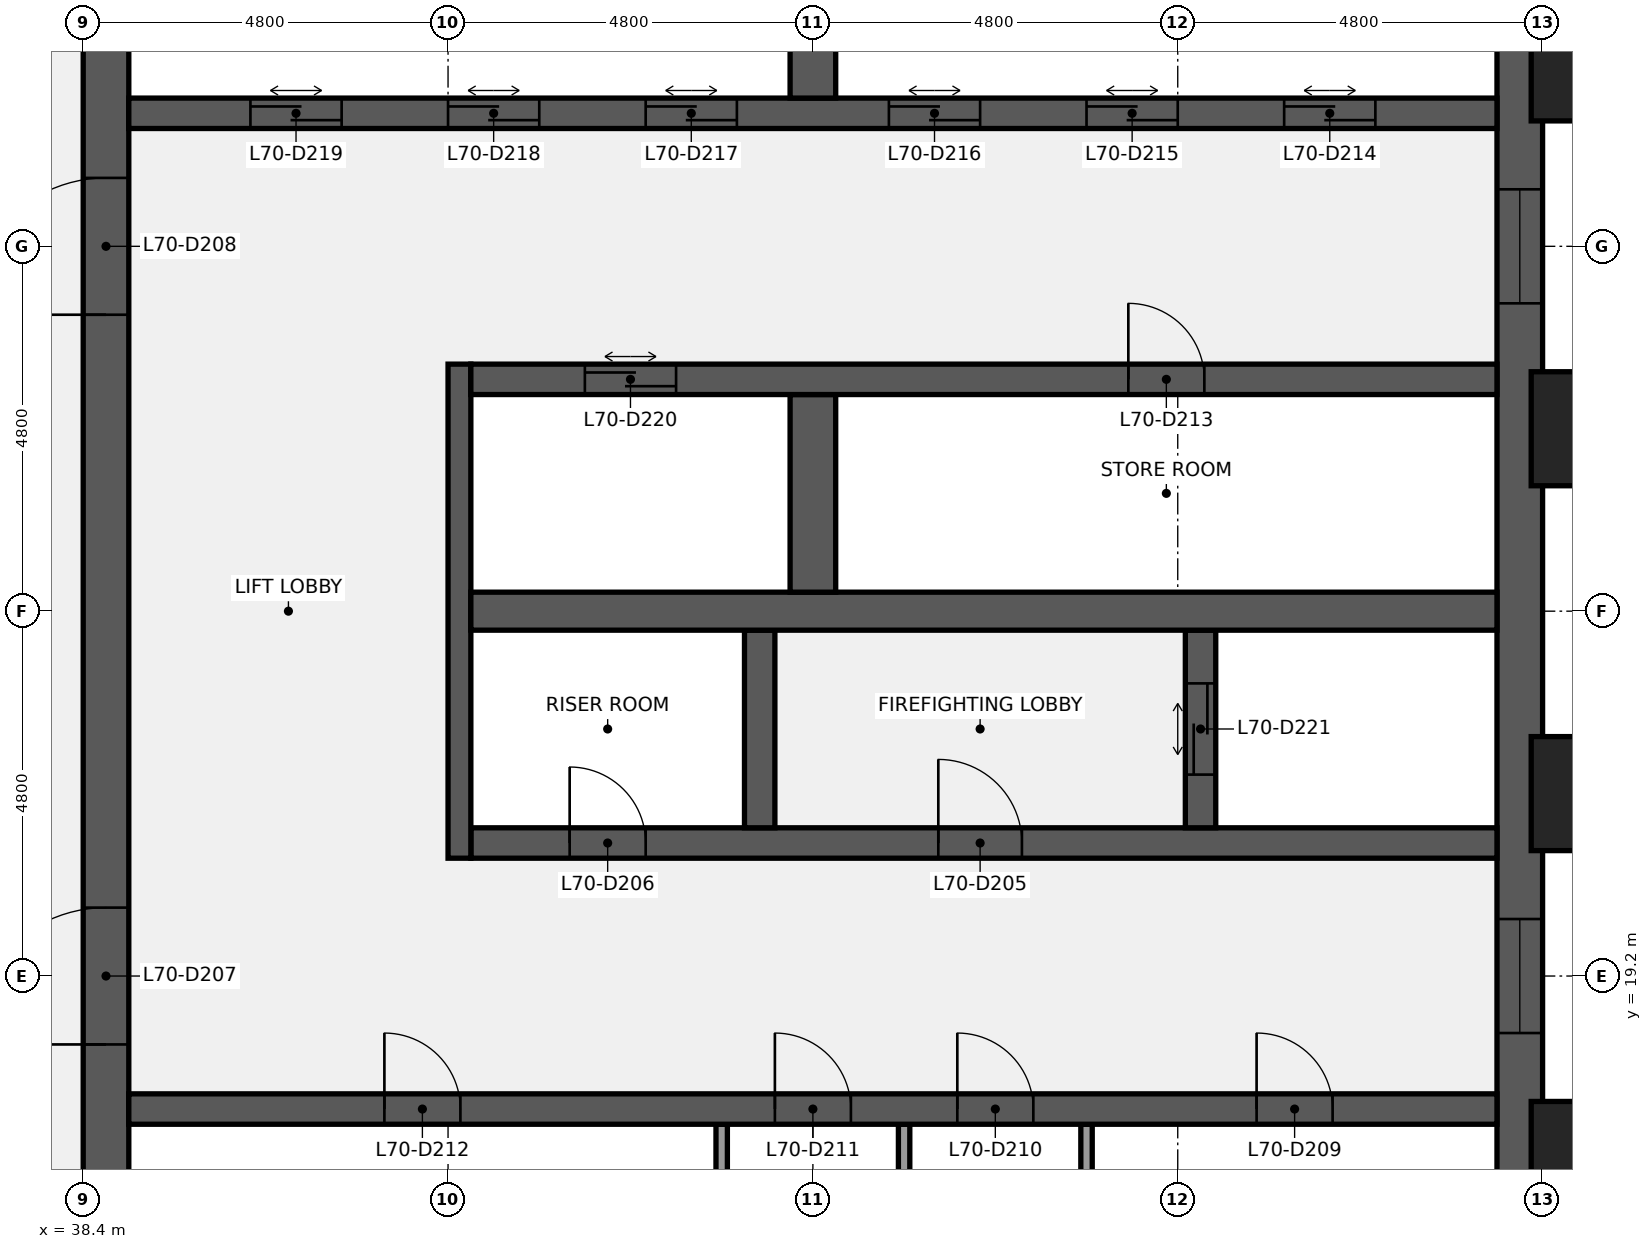
"""IFC4 building model, lengths in metres.
Left out: names, types, materials, properties, quantities, classifications, styles, units other than length and angle.
Written with IfcOpenShell. Run it as: python <this file> out.ifc"""

import sys

from ifc_helpers import new_model, si_unit, direction, frame, frame_2d, origin, origin_2d, place, context, subcontext, project, spatial, rectangle, extrude, element, fill, save


model = new_model("IFC4")
c1 = context("Model", 3, precision=1e-05, world=origin(), true_north=direction((0.0, 1.0)))
c2 = subcontext(c1, "Body", "Model", "MODEL_VIEW")
j1 = project(units=[si_unit("LENGTHUNIT", "METRE"), si_unit("PLANEANGLEUNIT", "RADIAN")], contexts=[c1])
p1 = place(None, origin())
s1 = spatial("IfcSite", under=j1, at=p1, CompositionType="ELEMENT")
p2 = place(p1, origin())
s2 = spatial("IfcBuilding", under=s1, at=p2, CompositionType="ELEMENT")
p3 = place(p2, frame((0.0, 0.0, 318.3)))
s3 = spatial("IfcBuildingStorey", under=s2, at=p3, CompositionType="ELEMENT", Elevation=318.3)
p4 = place(p3, frame((57.3, 38.4, 0.0), z_axis=(0.0, 0.0, 1.0), x_axis=(0.0, -1.0, 0.0)))
e1 = element("IfcWall", 1, at=p4, inside=s3, PredefinedType="SHEAR", context=c2, shape_type="SweptSolid", body=[
    extrude(rectangle(XDim=28.8, YDim=0.6, at=frame_2d((14.4, 0.0))), origin(), (0.0, 0.0, 1.0), 3.84),
])
p5 = place(p4, frame((18.45, 0.0, 0.9)))
e2 = element("IfcOpeningElement", 2, at=p5, cuts=e1, PredefinedType="OPENING", context=c2, shape_type="SweptSolid", body=[
    extrude(rectangle(XDim=1.5, YDim=1.5, at=frame_2d((0.75, 0.75))), frame((0.0, 0.31, 0.0), z_axis=(0.0, -1.0, 0.0), x_axis=(1.0, 0.0, 0.0)), (0.0, 0.0, 1.0), 0.62),
])
p6 = place(p4, frame((8.85, 0.0, 0.9)))
e3 = element("IfcOpeningElement", 3, at=p6, cuts=e1, PredefinedType="OPENING", context=c2, shape_type="SweptSolid", body=[
    extrude(rectangle(XDim=1.5, YDim=1.5, at=frame_2d((0.75, 0.75))), frame((0.0, 0.31, 0.0), z_axis=(0.0, -1.0, 0.0), x_axis=(1.0, 0.0, 0.0)), (0.0, 0.0, 1.0), 0.62),
])
p7 = place(p3, frame((38.7, 9.6, 0.0), z_axis=(0.0, 0.0, 1.0), x_axis=(0.0, 1.0, 0.0)))
e4 = element("IfcWall", 4, at=p7, inside=s3, PredefinedType="SHEAR", context=c2, shape_type="SweptSolid", body=[
    extrude(rectangle(XDim=28.8, YDim=0.6, at=frame_2d((14.4, 0.0))), origin(), (0.0, 0.0, 1.0), 3.84),
])
p8 = place(p7, frame((8.7, 0.0, 0.0)))
e5 = element("IfcOpeningElement", 5, at=p8, cuts=e4, PredefinedType="OPENING", context=c2, shape_type="SweptSolid", body=[
    extrude(rectangle(XDim=1.8, YDim=2.1, at=frame_2d((0.9, 1.05))), frame((0.0, 0.31, 0.0), z_axis=(0.0, -1.0, 0.0), x_axis=(1.0, 0.0, 0.0)), (0.0, 0.0, 1.0), 0.62),
])
p9 = place(p7, frame((18.3, 0.0, 0.0)))
e6 = element("IfcOpeningElement", 6, at=p9, cuts=e4, PredefinedType="OPENING", context=c2, shape_type="SweptSolid", body=[
    extrude(rectangle(XDim=1.8, YDim=2.1, at=frame_2d((0.9, 1.05))), frame((0.0, 0.31, 0.0), z_axis=(0.0, -1.0, 0.0), x_axis=(1.0, 0.0, 0.0)), (0.0, 0.0, 1.0), 0.62),
])
for number, where, z_axis, x_axis in (
    (7, (51.6, 14.65, 0.0), (0.0, 0.0, 1.0), (0.0, 1.0, 0.0)),
    (8, (49.2, 14.65, 0.0), (0.0, 0.0, 1.0), (0.0, 1.0, 0.0)),
    (9, (46.8, 14.65, 0.0), (0.0, 0.0, 1.0), (0.0, 1.0, 0.0)),
):
    element("IfcWall", number, at=place(p3, frame(where, z_axis=z_axis, x_axis=x_axis)), inside=s3, PredefinedType="PARTITIONING", context=c2, shape_type="SweptSolid", body=[
        extrude(rectangle(XDim=2.6, YDim=0.15, at=frame_2d((1.3, 0.0))), origin(), (0.0, 0.0, 1.0), 3.84),
    ])
p10 = place(p3, frame((39.0, 17.45, 0.0), z_axis=(0.0, 0.0, 1.0), x_axis=(1.0, 0.0, 0.0)))
e10 = element("IfcWall", 10, at=p10, inside=s3, PredefinedType="SHEAR", context=c2, shape_type="SweptSolid", body=[
    extrude(rectangle(XDim=18.0, YDim=0.4, at=frame_2d((9.0, 0.0))), origin(), (0.0, 0.0, 1.0), 3.84),
])
p11 = place(p10, frame((14.837, 0.0, 0.0)))
e11 = element("IfcOpeningElement", 11, at=p11, cuts=e10, PredefinedType="OPENING", context=c2, shape_type="SweptSolid", body=[
    extrude(rectangle(XDim=1.0, YDim=2.1, at=frame_2d((0.5, 1.05))), frame((0.0, 0.21, 0.0), z_axis=(0.0, -1.0, 0.0), x_axis=(1.0, 0.0, 0.0)), (0.0, 0.0, 1.0), 0.42),
])
p12 = place(p10, frame((10.9, 0.0, 0.0)))
e12 = element("IfcOpeningElement", 12, at=p12, cuts=e10, PredefinedType="OPENING", context=c2, shape_type="SweptSolid", body=[
    extrude(rectangle(XDim=1.0, YDim=2.1, at=frame_2d((0.5, 1.05))), frame((0.0, 0.21, 0.0), z_axis=(0.0, -1.0, 0.0), x_axis=(1.0, 0.0, 0.0)), (0.0, 0.0, 1.0), 0.42),
])
p13 = place(p10, frame((8.5, 0.0, 0.0)))
e13 = element("IfcOpeningElement", 13, at=p13, cuts=e10, PredefinedType="OPENING", context=c2, shape_type="SweptSolid", body=[
    extrude(rectangle(XDim=1.0, YDim=2.1, at=frame_2d((0.5, 1.05))), frame((0.0, 0.21, 0.0), z_axis=(0.0, -1.0, 0.0), x_axis=(1.0, 0.0, 0.0)), (0.0, 0.0, 1.0), 0.42),
])
p14 = place(p10, frame((3.363, 0.0, 0.0)))
e14 = element("IfcOpeningElement", 14, at=p14, cuts=e10, PredefinedType="OPENING", context=c2, shape_type="SweptSolid", body=[
    extrude(rectangle(XDim=1.0, YDim=2.1, at=frame_2d((0.5, 1.05))), frame((0.0, 0.21, 0.0), z_axis=(0.0, -1.0, 0.0), x_axis=(1.0, 0.0, 0.0)), (0.0, 0.0, 1.0), 0.42),
])
p15 = place(p3, frame((43.5, 20.95, 0.0), z_axis=(0.0, 0.0, 1.0), x_axis=(1.0, 0.0, 0.0)))
e15 = element("IfcWall", 15, at=p15, inside=s3, PredefinedType="SHEAR", context=c2, shape_type="SweptSolid", body=[
    extrude(rectangle(XDim=13.5, YDim=0.4, at=frame_2d((6.75, 0.0))), origin(), (0.0, 0.0, 1.0), 3.84),
])
p16 = place(p15, frame((6.15, 0.0, 0.0)))
e16 = element("IfcOpeningElement", 16, at=p16, cuts=e15, PredefinedType="OPENING", context=c2, shape_type="SweptSolid", body=[
    extrude(rectangle(XDim=1.1, YDim=2.1, at=frame_2d((0.55, 1.05))), frame((0.0, 0.21, 0.0), z_axis=(0.0, -1.0, 0.0), x_axis=(1.0, 0.0, 0.0)), (0.0, 0.0, 1.0), 0.42),
])
p17 = place(p15, frame((1.3, 0.0, 0.0)))
e17 = element("IfcOpeningElement", 17, at=p17, cuts=e15, PredefinedType="OPENING", context=c2, shape_type="SweptSolid", body=[
    extrude(rectangle(XDim=1.0, YDim=2.1, at=frame_2d((0.5, 1.05))), frame((0.0, 0.21, 0.0), z_axis=(0.0, -1.0, 0.0), x_axis=(1.0, 0.0, 0.0)), (0.0, 0.0, 1.0), 0.42),
])
p18 = place(p3, frame((43.35, 20.75, 0.0), z_axis=(0.0, 0.0, 1.0), x_axis=(0.0, 1.0, 0.0)))
e18 = element("IfcWall", 18, at=p18, inside=s3, PredefinedType="SHEAR", context=c2, shape_type="SweptSolid", body=[
    extrude(rectangle(XDim=6.5, YDim=0.3, at=frame_2d((3.25, 0.0))), origin(), (0.0, 0.0, 1.0), 3.84),
])
p19 = place(p3, frame((53.1, 21.15, 0.0), z_axis=(0.0, 0.0, 1.0), x_axis=(0.0, 1.0, 0.0)))
e19 = element("IfcWall", 19, at=p19, inside=s3, PredefinedType="SHEAR", context=c2, shape_type="SweptSolid", body=[
    extrude(rectangle(XDim=2.6, YDim=0.4, at=frame_2d((1.3, 0.0))), origin(), (0.0, 0.0, 1.0), 3.84),
])
p20 = place(p19, frame((0.7, 0.0, 0.0)))
e20 = element("IfcOpeningElement", 20, at=p20, cuts=e19, PredefinedType="OPENING", context=c2, shape_type="SweptSolid", body=[
    extrude(rectangle(XDim=1.2, YDim=2.1, at=frame_2d((0.6, 1.05))), frame((0.0, 0.21, 0.0), z_axis=(0.0, -1.0, 0.0), x_axis=(1.0, 0.0, 0.0)), (0.0, 0.0, 1.0), 0.42),
])
p21 = place(p3, frame((47.3, 21.15, 0.0), z_axis=(0.0, 0.0, 1.0), x_axis=(0.0, 1.0, 0.0)))
e21 = element("IfcWall", 21, at=p21, inside=s3, PredefinedType="SHEAR", context=c2, shape_type="SweptSolid", body=[
    extrude(rectangle(XDim=2.6, YDim=0.4, at=frame_2d((1.3, 0.0))), origin(), (0.0, 0.0, 1.0), 3.84),
])
p22 = place(p3, frame((43.5, 24.0, 0.0), z_axis=(0.0, 0.0, 1.0), x_axis=(1.0, 0.0, 0.0)))
e22 = element("IfcWall", 22, at=p22, inside=s3, PredefinedType="SHEAR", context=c2, shape_type="SweptSolid", body=[
    extrude(rectangle(XDim=13.5, YDim=0.5, at=frame_2d((6.75, 0.0))), origin(), (0.0, 0.0, 1.0), 3.84),
])
p23 = place(p3, frame((48.0, 24.25, 0.0), z_axis=(0.0, 0.0, 1.0), x_axis=(0.0, 1.0, 0.0)))
e23 = element("IfcWall", 23, at=p23, inside=s3, PredefinedType="SHEAR", context=c2, shape_type="SweptSolid", body=[
    extrude(rectangle(XDim=2.6, YDim=0.6, at=frame_2d((1.3, 0.0))), origin(), (0.0, 0.0, 1.0), 3.84),
])
p24 = place(p3, frame((43.5, 27.05, 0.0), z_axis=(0.0, 0.0, 1.0), x_axis=(1.0, 0.0, 0.0)))
e24 = element("IfcWall", 24, at=p24, inside=s3, PredefinedType="SHEAR", context=c2, shape_type="SweptSolid", body=[
    extrude(rectangle(XDim=13.5, YDim=0.4, at=frame_2d((6.75, 0.0))), origin(), (0.0, 0.0, 1.0), 3.84),
])
p25 = place(p24, frame((8.65, 0.0, 0.0)))
e25 = element("IfcOpeningElement", 25, at=p25, cuts=e24, PredefinedType="OPENING", context=c2, shape_type="SweptSolid", body=[
    extrude(rectangle(XDim=1.0, YDim=2.1, at=frame_2d((0.5, 1.05))), frame((0.0, 0.21, 0.0), z_axis=(0.0, -1.0, 0.0), x_axis=(1.0, 0.0, 0.0)), (0.0, 0.0, 1.0), 0.42),
])
p26 = place(p24, frame((1.5, 0.0, 0.0)))
e26 = element("IfcOpeningElement", 26, at=p26, cuts=e24, PredefinedType="OPENING", context=c2, shape_type="SweptSolid", body=[
    extrude(rectangle(XDim=1.2, YDim=2.1, at=frame_2d((0.6, 1.05))), frame((0.0, 0.21, 0.0), z_axis=(0.0, -1.0, 0.0), x_axis=(1.0, 0.0, 0.0)), (0.0, 0.0, 1.0), 0.42),
])
p27 = place(p3, frame((39.0, 30.55, 0.0), z_axis=(0.0, 0.0, 1.0), x_axis=(1.0, 0.0, 0.0)))
e27 = element("IfcWall", 27, at=p27, inside=s3, PredefinedType="SHEAR", context=c2, shape_type="SweptSolid", body=[
    extrude(rectangle(XDim=18.0, YDim=0.4, at=frame_2d((9.0, 0.0))), origin(), (0.0, 0.0, 1.0), 3.84),
])
p28 = place(p27, frame((15.2, 0.0, 0.0)))
e28 = element("IfcOpeningElement", 28, at=p28, cuts=e27, PredefinedType="OPENING", context=c2, shape_type="SweptSolid", body=[
    extrude(rectangle(XDim=1.2, YDim=2.1, at=frame_2d((0.6, 1.05))), frame((0.0, 0.21, 0.0), z_axis=(0.0, -1.0, 0.0), x_axis=(1.0, 0.0, 0.0)), (0.0, 0.0, 1.0), 0.42),
])
p29 = place(p27, frame((12.6, 0.0, 0.0)))
e29 = element("IfcOpeningElement", 29, at=p29, cuts=e27, PredefinedType="OPENING", context=c2, shape_type="SweptSolid", body=[
    extrude(rectangle(XDim=1.2, YDim=2.1, at=frame_2d((0.6, 1.05))), frame((0.0, 0.21, 0.0), z_axis=(0.0, -1.0, 0.0), x_axis=(1.0, 0.0, 0.0)), (0.0, 0.0, 1.0), 0.42),
])
p30 = place(p27, frame((10.0, 0.0, 0.0)))
e30 = element("IfcOpeningElement", 30, at=p30, cuts=e27, PredefinedType="OPENING", context=c2, shape_type="SweptSolid", body=[
    extrude(rectangle(XDim=1.2, YDim=2.1, at=frame_2d((0.6, 1.05))), frame((0.0, 0.21, 0.0), z_axis=(0.0, -1.0, 0.0), x_axis=(1.0, 0.0, 0.0)), (0.0, 0.0, 1.0), 0.42),
])
p31 = place(p27, frame((6.8, 0.0, 0.0)))
e31 = element("IfcOpeningElement", 31, at=p31, cuts=e27, PredefinedType="OPENING", context=c2, shape_type="SweptSolid", body=[
    extrude(rectangle(XDim=1.2, YDim=2.1, at=frame_2d((0.6, 1.05))), frame((0.0, 0.21, 0.0), z_axis=(0.0, -1.0, 0.0), x_axis=(1.0, 0.0, 0.0)), (0.0, 0.0, 1.0), 0.42),
])
p32 = place(p27, frame((4.2, 0.0, 0.0)))
e32 = element("IfcOpeningElement", 32, at=p32, cuts=e27, PredefinedType="OPENING", context=c2, shape_type="SweptSolid", body=[
    extrude(rectangle(XDim=1.2, YDim=2.1, at=frame_2d((0.6, 1.05))), frame((0.0, 0.21, 0.0), z_axis=(0.0, -1.0, 0.0), x_axis=(1.0, 0.0, 0.0)), (0.0, 0.0, 1.0), 0.42),
])
p33 = place(p27, frame((1.6, 0.0, 0.0)))
e33 = element("IfcOpeningElement", 33, at=p33, cuts=e27, PredefinedType="OPENING", context=c2, shape_type="SweptSolid", body=[
    extrude(rectangle(XDim=1.2, YDim=2.1, at=frame_2d((0.6, 1.05))), frame((0.0, 0.21, 0.0), z_axis=(0.0, -1.0, 0.0), x_axis=(1.0, 0.0, 0.0)), (0.0, 0.0, 1.0), 0.42),
])
p34 = place(p3, frame((48.0, 30.75, 0.0), z_axis=(0.0, 0.0, 1.0), x_axis=(0.0, 1.0, 0.0)))
e34 = element("IfcWall", 34, at=p34, inside=s3, PredefinedType="SHEAR", context=c2, shape_type="SweptSolid", body=[
    extrude(rectangle(XDim=2.6, YDim=0.6, at=frame_2d((1.3, 0.0))), origin(), (0.0, 0.0, 1.0), 3.84),
])
for number, where, z_axis, x_axis in (
    (35, (58.35, 16.8, 0.0), (0.0, 0.0, 1.0), (0.0, 1.0, 0.0)),
    (36, (58.35, 21.6, 0.0), (0.0, 0.0, 1.0), (0.0, 1.0, 0.0)),
    (37, (58.35, 26.4, 0.0), (0.0, 0.0, 1.0), (0.0, 1.0, 0.0)),
    (38, (58.35, 31.2, 0.0), (0.0, 0.0, 1.0), (0.0, 1.0, 0.0)),
):
    element("IfcColumn", number, at=place(p3, frame(where, z_axis=z_axis, x_axis=x_axis)), inside=s3, PredefinedType="PILASTER", context=c2, shape_type="SweptSolid", body=[
        extrude(rectangle(XDim=1.8, YDim=1.5, at=origin_2d()), origin(), (0.0, 0.0, 1.0), 4.0),
    ])
p35 = place(p16, origin())
e39 = element("IfcDoor", 39, at=p35, inside=s3, OperationType="SINGLE_SWING_LEFT", PredefinedType="DOOR", context=c2, shape_type="SweptSolid", body=[
    extrude(rectangle(XDim=1.1, YDim=2.1, at=frame_2d((0.55, 1.05))), frame((0.0, 0.025, 0.0), z_axis=(0.0, -1.0, 0.0), x_axis=(1.0, 0.0, 0.0)), (0.0, 0.0, 1.0), 0.05),
])
fill(e16, e39)
p36 = place(p17, origin())
e40 = element("IfcDoor", 40, at=p36, inside=s3, OperationType="SINGLE_SWING_LEFT", PredefinedType="DOOR", context=c2, shape_type="SweptSolid", body=[
    extrude(rectangle(XDim=1.0, YDim=2.1, at=frame_2d((0.5, 1.05))), frame((0.0, 0.025, 0.0), z_axis=(0.0, -1.0, 0.0), x_axis=(1.0, 0.0, 0.0)), (0.0, 0.0, 1.0), 0.05),
])
fill(e17, e40)
p37 = place(p8, origin())
e41 = element("IfcDoor", 41, at=p37, inside=s3, OperationType="DOUBLE_DOOR_SINGLE_SWING", PredefinedType="DOOR", context=c2, shape_type="SweptSolid", body=[
    extrude(rectangle(XDim=1.8, YDim=2.1, at=frame_2d((0.9, 1.05))), frame((0.0, 0.025, 0.0), z_axis=(0.0, -1.0, 0.0), x_axis=(1.0, 0.0, 0.0)), (0.0, 0.0, 1.0), 0.05),
])
fill(e5, e41)
p38 = place(p9, origin())
e42 = element("IfcDoor", 42, at=p38, inside=s3, OperationType="DOUBLE_DOOR_SINGLE_SWING", PredefinedType="DOOR", context=c2, shape_type="SweptSolid", body=[
    extrude(rectangle(XDim=1.8, YDim=2.1, at=frame_2d((0.9, 1.05))), frame((0.0, 0.025, 0.0), z_axis=(0.0, -1.0, 0.0), x_axis=(1.0, 0.0, 0.0)), (0.0, 0.0, 1.0), 0.05),
])
fill(e6, e42)
p39 = place(p11, origin())
e43 = element("IfcDoor", 43, at=p39, inside=s3, OperationType="SINGLE_SWING_LEFT", PredefinedType="DOOR", context=c2, shape_type="SweptSolid", body=[
    extrude(rectangle(XDim=1.0, YDim=2.1, at=frame_2d((0.5, 1.05))), frame((0.0, 0.025, 0.0), z_axis=(0.0, -1.0, 0.0), x_axis=(1.0, 0.0, 0.0)), (0.0, 0.0, 1.0), 0.05),
])
fill(e11, e43)
p40 = place(p12, origin())
e44 = element("IfcDoor", 44, at=p40, inside=s3, OperationType="SINGLE_SWING_LEFT", PredefinedType="DOOR", context=c2, shape_type="SweptSolid", body=[
    extrude(rectangle(XDim=1.0, YDim=2.1, at=frame_2d((0.5, 1.05))), frame((0.0, 0.025, 0.0), z_axis=(0.0, -1.0, 0.0), x_axis=(1.0, 0.0, 0.0)), (0.0, 0.0, 1.0), 0.05),
])
fill(e12, e44)
p41 = place(p13, origin())
e45 = element("IfcDoor", 45, at=p41, inside=s3, OperationType="SINGLE_SWING_LEFT", PredefinedType="DOOR", context=c2, shape_type="SweptSolid", body=[
    extrude(rectangle(XDim=1.0, YDim=2.1, at=frame_2d((0.5, 1.05))), frame((0.0, 0.025, 0.0), z_axis=(0.0, -1.0, 0.0), x_axis=(1.0, 0.0, 0.0)), (0.0, 0.0, 1.0), 0.05),
])
fill(e13, e45)
p42 = place(p14, origin())
e46 = element("IfcDoor", 46, at=p42, inside=s3, OperationType="SINGLE_SWING_LEFT", PredefinedType="DOOR", context=c2, shape_type="SweptSolid", body=[
    extrude(rectangle(XDim=1.0, YDim=2.1, at=frame_2d((0.5, 1.05))), frame((0.0, 0.025, 0.0), z_axis=(0.0, -1.0, 0.0), x_axis=(1.0, 0.0, 0.0)), (0.0, 0.0, 1.0), 0.05),
])
fill(e14, e46)
p43 = place(p25, origin())
e47 = element("IfcDoor", 47, at=p43, inside=s3, OperationType="SINGLE_SWING_LEFT", PredefinedType="DOOR", context=c2, shape_type="SweptSolid", body=[
    extrude(rectangle(XDim=1.0, YDim=2.1, at=frame_2d((0.5, 1.05))), frame((0.0, 0.025, 0.0), z_axis=(0.0, -1.0, 0.0), x_axis=(1.0, 0.0, 0.0)), (0.0, 0.0, 1.0), 0.05),
])
fill(e25, e47)
p44 = place(p28, origin())
e48 = element("IfcDoor", 48, at=p44, inside=s3, OperationType="DOUBLE_DOOR_SLIDING", PredefinedType="DOOR", context=c2, shape_type="SweptSolid", body=[
    extrude(rectangle(XDim=1.2, YDim=2.1, at=frame_2d((0.6, 1.05))), frame((0.0, 0.025, 0.0), z_axis=(0.0, -1.0, 0.0), x_axis=(1.0, 0.0, 0.0)), (0.0, 0.0, 1.0), 0.05),
])
fill(e28, e48)
p45 = place(p29, origin())
e49 = element("IfcDoor", 49, at=p45, inside=s3, OperationType="DOUBLE_DOOR_SLIDING", PredefinedType="DOOR", context=c2, shape_type="SweptSolid", body=[
    extrude(rectangle(XDim=1.2, YDim=2.1, at=frame_2d((0.6, 1.05))), frame((0.0, 0.025, 0.0), z_axis=(0.0, -1.0, 0.0), x_axis=(1.0, 0.0, 0.0)), (0.0, 0.0, 1.0), 0.05),
])
fill(e29, e49)
p46 = place(p30, origin())
e50 = element("IfcDoor", 50, at=p46, inside=s3, OperationType="DOUBLE_DOOR_SLIDING", PredefinedType="DOOR", context=c2, shape_type="SweptSolid", body=[
    extrude(rectangle(XDim=1.2, YDim=2.1, at=frame_2d((0.6, 1.05))), frame((0.0, 0.025, 0.0), z_axis=(0.0, -1.0, 0.0), x_axis=(1.0, 0.0, 0.0)), (0.0, 0.0, 1.0), 0.05),
])
fill(e30, e50)
p47 = place(p31, origin())
e51 = element("IfcDoor", 51, at=p47, inside=s3, OperationType="DOUBLE_DOOR_SLIDING", PredefinedType="DOOR", context=c2, shape_type="SweptSolid", body=[
    extrude(rectangle(XDim=1.2, YDim=2.1, at=frame_2d((0.6, 1.05))), frame((0.0, 0.025, 0.0), z_axis=(0.0, -1.0, 0.0), x_axis=(1.0, 0.0, 0.0)), (0.0, 0.0, 1.0), 0.05),
])
fill(e31, e51)
p48 = place(p32, origin())
e52 = element("IfcDoor", 52, at=p48, inside=s3, OperationType="DOUBLE_DOOR_SLIDING", PredefinedType="DOOR", context=c2, shape_type="SweptSolid", body=[
    extrude(rectangle(XDim=1.2, YDim=2.1, at=frame_2d((0.6, 1.05))), frame((0.0, 0.025, 0.0), z_axis=(0.0, -1.0, 0.0), x_axis=(1.0, 0.0, 0.0)), (0.0, 0.0, 1.0), 0.05),
])
fill(e32, e52)
p49 = place(p33, origin())
e53 = element("IfcDoor", 53, at=p49, inside=s3, OperationType="DOUBLE_DOOR_SLIDING", PredefinedType="DOOR", context=c2, shape_type="SweptSolid", body=[
    extrude(rectangle(XDim=1.2, YDim=2.1, at=frame_2d((0.6, 1.05))), frame((0.0, 0.025, 0.0), z_axis=(0.0, -1.0, 0.0), x_axis=(1.0, 0.0, 0.0)), (0.0, 0.0, 1.0), 0.05),
])
fill(e33, e53)
p50 = place(p26, origin())
e54 = element("IfcDoor", 54, at=p50, inside=s3, OperationType="DOUBLE_DOOR_SLIDING", PredefinedType="DOOR", context=c2, shape_type="SweptSolid", body=[
    extrude(rectangle(XDim=1.2, YDim=2.1, at=frame_2d((0.6, 1.05))), frame((0.0, 0.025, 0.0), z_axis=(0.0, -1.0, 0.0), x_axis=(1.0, 0.0, 0.0)), (0.0, 0.0, 1.0), 0.05),
])
fill(e26, e54)
p51 = place(p20, origin())
e55 = element("IfcDoor", 55, at=p51, inside=s3, OperationType="DOUBLE_DOOR_SLIDING", PredefinedType="DOOR", context=c2, shape_type="SweptSolid", body=[
    extrude(rectangle(XDim=1.2, YDim=2.1, at=frame_2d((0.6, 1.05))), frame((0.0, 0.025, 0.0), z_axis=(0.0, -1.0, 0.0), x_axis=(1.0, 0.0, 0.0)), (0.0, 0.0, 1.0), 0.05),
])
fill(e20, e55)
p52 = place(p5, origin())
e56 = element("IfcWindow", 56, at=p52, inside=s3, PartitioningType="SINGLE_PANEL", PredefinedType="WINDOW", context=c2, shape_type="SweptSolid", body=[
    extrude(rectangle(XDim=1.5, YDim=1.5, at=frame_2d((0.75, 0.75))), frame((0.0, 0.03, 0.0), z_axis=(0.0, -1.0, 0.0), x_axis=(1.0, 0.0, 0.0)), (0.0, 0.0, 1.0), 0.06),
])
fill(e2, e56)
p53 = place(p6, origin())
e57 = element("IfcWindow", 57, at=p53, inside=s3, PartitioningType="SINGLE_PANEL", PredefinedType="WINDOW", context=c2, shape_type="SweptSolid", body=[
    extrude(rectangle(XDim=1.5, YDim=1.5, at=frame_2d((0.75, 0.75))), frame((0.0, 0.03, 0.0), z_axis=(0.0, -1.0, 0.0), x_axis=(1.0, 0.0, 0.0)), (0.0, 0.0, 1.0), 0.06),
])
fill(e3, e57)
save(model, sys.argv[1])
